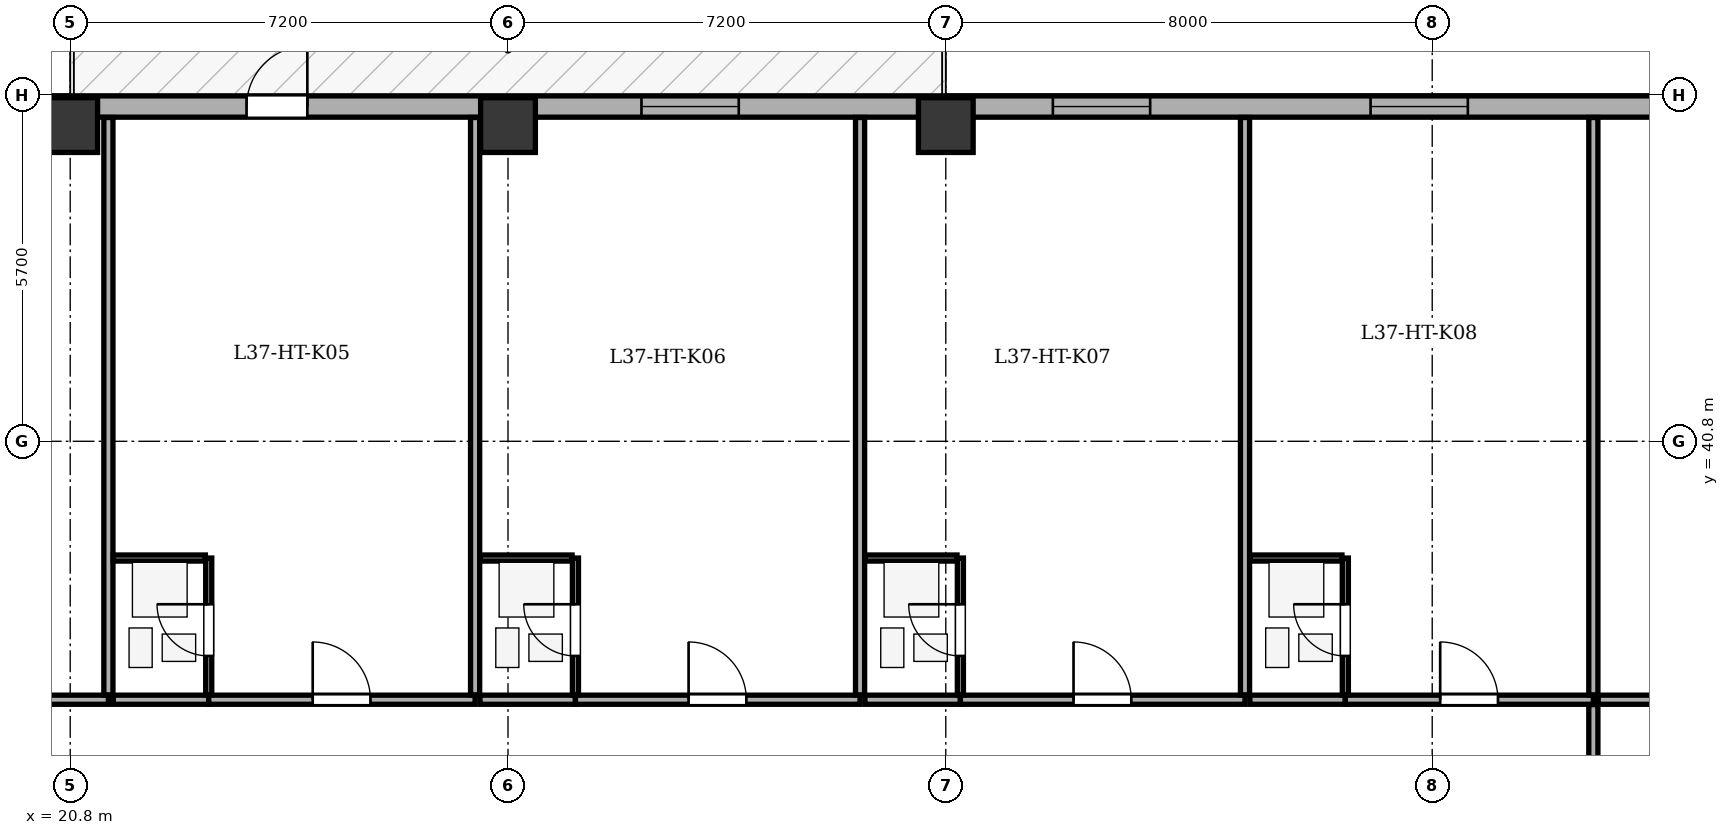
"""IFC4 building model, lengths in metres.
Left out: names, types, materials, properties, quantities, classifications, styles, units other than length and angle.
Written with IfcOpenShell. Run it as: python <this file> out.ifc"""

import sys

from ifc_helpers import new_model, si_unit, direction, frame, frame_2d, origin, origin_2d, place, context, subcontext, project, spatial, rectangle, extrude, element, fill, save


model = new_model("IFC4")
c1 = context("Model", 3, precision=1e-05, world=origin(), true_north=direction((0.0, 1.0)))
c2 = subcontext(c1, "Body", "Model", "MODEL_VIEW")
j1 = project(units=[si_unit("LENGTHUNIT", "METRE"), si_unit("PLANEANGLEUNIT", "RADIAN")], contexts=[c1])
p1 = place(None, origin())
s1 = spatial("IfcSite", under=j1, at=p1, CompositionType="ELEMENT")
p2 = place(p1, origin())
s2 = spatial("IfcBuilding", under=s1, at=p2, CompositionType="ELEMENT")
p3 = place(p2, frame((0.0, 0.0, 148.3)))
s3 = spatial("IfcBuildingStorey", under=s2, at=p3, CompositionType="ELEMENT", Elevation=148.3)
for number, where, z_axis, x_axis in (
    (1, (20.8, 46.0, 0.0), (0.0, 0.0, 1.0), (1.0, 0.0, 0.0)),
    (2, (28.0, 46.0, 0.0), (0.0, 0.0, 1.0), (1.0, 0.0, 0.0)),
    (3, (35.2, 46.0, 0.0), (0.0, 0.0, 1.0), (1.0, 0.0, 0.0)),
):
    element("IfcColumn", number, at=place(p3, frame(where, z_axis=z_axis, x_axis=x_axis)), inside=s3, PredefinedType="COLUMN", context=c2, shape_type="SweptSolid", body=[
        extrude(rectangle(XDim=0.9, YDim=0.9, at=origin_2d()), origin(), (0.0, 0.0, 1.0), 3.5),
    ])
p4 = place(p3, frame((15.7, 46.305, 0.0), z_axis=(0.0, 0.0, 1.0), x_axis=(1.0, 0.0, 0.0)))
e4 = element("IfcWall", 4, at=p4, inside=s3, PredefinedType="STANDARD", context=c2, shape_type="SweptSolid", body=[
    extrude(rectangle(XDim=35.0, YDim=0.35, at=frame_2d((17.5, 0.0))), origin(), (0.0, 0.0, 1.0), 2.785),
])
p5 = place(p4, frame((8.0, 0.0, 0.0)))
e5 = element("IfcOpeningElement", 5, at=p5, cuts=e4, PredefinedType="OPENING", context=c2, shape_type="SweptSolid", body=[
    extrude(rectangle(XDim=1.0, YDim=2.02, at=frame_2d((0.5, 1.01))), frame((0.0, 0.185, 0.0), z_axis=(0.0, -1.0, 0.0), x_axis=(1.0, 0.0, 0.0)), (0.0, 0.0, 1.0), 0.37),
])
p6 = place(p4, frame((1.788, 0.0, 0.75)))
e6 = element("IfcOpeningElement", 6, at=p6, cuts=e4, PredefinedType="OPENING", context=c2, shape_type="SweptSolid", body=[
    extrude(rectangle(XDim=1.6, YDim=1.75, at=frame_2d((0.8, 0.875))), frame((0.0, 0.185, 0.0), z_axis=(0.0, -1.0, 0.0), x_axis=(1.0, 0.0, 0.0)), (0.0, 0.0, 1.0), 0.37),
])
p7 = place(p4, frame((14.495, 0.0, 0.75)))
e7 = element("IfcOpeningElement", 7, at=p7, cuts=e4, PredefinedType="OPENING", context=c2, shape_type="SweptSolid", body=[
    extrude(rectangle(XDim=1.6, YDim=1.75, at=frame_2d((0.8, 0.875))), frame((0.0, 0.185, 0.0), z_axis=(0.0, -1.0, 0.0), x_axis=(1.0, 0.0, 0.0)), (0.0, 0.0, 1.0), 0.37),
])
p8 = place(p4, frame((21.261, 0.0, 0.75)))
e8 = element("IfcOpeningElement", 8, at=p8, cuts=e4, PredefinedType="OPENING", context=c2, shape_type="SweptSolid", body=[
    extrude(rectangle(XDim=1.6, YDim=1.75, at=frame_2d((0.8, 0.875))), frame((0.0, 0.185, 0.0), z_axis=(0.0, -1.0, 0.0), x_axis=(1.0, 0.0, 0.0)), (0.0, 0.0, 1.0), 0.37),
])
p9 = place(p4, frame((26.486, 0.0, 0.75)))
e9 = element("IfcOpeningElement", 9, at=p9, cuts=e4, PredefinedType="OPENING", context=c2, shape_type="SweptSolid", body=[
    extrude(rectangle(XDim=1.6, YDim=1.75, at=frame_2d((0.8, 0.875))), frame((0.0, 0.185, 0.0), z_axis=(0.0, -1.0, 0.0), x_axis=(1.0, 0.0, 0.0)), (0.0, 0.0, 1.0), 0.37),
])
p10 = place(p4, frame((31.637, 0.0, 0.75)))
e10 = element("IfcOpeningElement", 10, at=p10, cuts=e4, PredefinedType="OPENING", context=c2, shape_type="SweptSolid", body=[
    extrude(rectangle(XDim=1.6, YDim=1.75, at=frame_2d((0.8, 0.875))), frame((0.0, 0.185, 0.0), z_axis=(0.0, -1.0, 0.0), x_axis=(1.0, 0.0, 0.0)), (0.0, 0.0, 1.0), 0.37),
])
p11 = place(p3, frame((17.35, 36.55, 0.0), z_axis=(0.0, 0.0, 1.0), x_axis=(1.0, 0.0, 0.0)))
e11 = element("IfcWall", 11, at=p11, inside=s3, PredefinedType="PARTITIONING", context=c2, shape_type="SweptSolid", body=[
    extrude(rectangle(XDim=4.078, YDim=0.15, at=frame_2d((2.039, 0.0))), origin(), (0.0, 0.0, 1.0), 3.2),
])
p12 = place(p11, frame((1.559, 0.0, 0.0)))
e12 = element("IfcOpeningElement", 12, at=p12, cuts=e11, PredefinedType="OPENING", context=c2, shape_type="SweptSolid", body=[
    extrude(rectangle(XDim=0.95, YDim=2.1, at=frame_2d((0.475, 1.05))), frame((0.0, 0.085, 0.0), z_axis=(0.0, -1.0, 0.0), x_axis=(1.0, 0.0, 0.0)), (0.0, 0.0, 1.0), 0.17),
])
p13 = place(p3, frame((21.428, 36.63, 0.0), z_axis=(0.0, 0.0, 1.0), x_axis=(0.0, 1.0, 0.0)))
e13 = element("IfcWall", 13, at=p13, inside=s3, PredefinedType="PARTITIONING", context=c2, shape_type="SweptSolid", body=[
    extrude(rectangle(XDim=9.495, YDim=0.15, at=frame_2d((4.748, 0.0))), origin(), (0.0, 0.0, 1.0), 3.2),
])
p14 = place(p3, frame((21.508, 36.55, 0.0), z_axis=(0.0, 0.0, 1.0), x_axis=(1.0, 0.0, 0.0)))
e14 = element("IfcWall", 14, at=p14, inside=s3, PredefinedType="PARTITIONING", context=c2, shape_type="SweptSolid", body=[
    extrude(rectangle(XDim=1.57, YDim=0.15, at=frame_2d((0.785, 0.0))), origin(), (0.0, 0.0, 1.0), 3.2),
])
p15 = place(p3, frame((23.078, 36.55, 0.0), z_axis=(0.0, 0.0, 1.0), x_axis=(1.0, 0.0, 0.0)))
e15 = element("IfcWall", 15, at=p15, inside=s3, PredefinedType="PARTITIONING", context=c2, shape_type="SweptSolid", body=[
    extrude(rectangle(XDim=4.381, YDim=0.15, at=frame_2d((2.19, 0.0))), origin(), (0.0, 0.0, 1.0), 3.2),
])
p16 = place(p15, frame((1.71, 0.0, 0.0)))
e16 = element("IfcOpeningElement", 16, at=p16, cuts=e15, PredefinedType="OPENING", context=c2, shape_type="SweptSolid", body=[
    extrude(rectangle(XDim=0.95, YDim=2.1, at=frame_2d((0.475, 1.05))), frame((0.0, 0.085, 0.0), z_axis=(0.0, -1.0, 0.0), x_axis=(1.0, 0.0, 0.0)), (0.0, 0.0, 1.0), 0.17),
])
p17 = place(p3, frame((23.078, 36.63, 0.0), z_axis=(0.0, 0.0, 1.0), x_axis=(0.0, 1.0, 0.0)))
e17 = element("IfcWall", 17, at=p17, inside=s3, PredefinedType="PARTITIONING", context=c2, shape_type="SweptSolid", body=[
    extrude(rectangle(XDim=2.25, YDim=0.1, at=frame_2d((1.125, 0.0))), origin(), (0.0, 0.0, 1.0), 3.2),
])
p18 = place(p17, frame((0.64, 0.0, 0.0)))
e18 = element("IfcOpeningElement", 18, at=p18, cuts=e17, PredefinedType="OPENING", context=c2, shape_type="SweptSolid", body=[
    extrude(rectangle(XDim=0.85, YDim=2.05, at=frame_2d((0.425, 1.025))), frame((0.0, 0.06, 0.0), z_axis=(0.0, -1.0, 0.0), x_axis=(1.0, 0.0, 0.0)), (0.0, 0.0, 1.0), 0.12),
])
p19 = place(p3, frame((21.508, 38.88, 0.0), z_axis=(0.0, 0.0, 1.0), x_axis=(1.0, 0.0, 0.0)))
e19 = element("IfcWall", 19, at=p19, inside=s3, PredefinedType="PARTITIONING", context=c2, shape_type="SweptSolid", body=[
    extrude(rectangle(XDim=1.515, YDim=0.1, at=frame_2d((0.757, 0.0))), origin(), (0.0, 0.0, 1.0), 3.2),
])
p20 = place(p3, frame((27.459, 36.63, 0.0), z_axis=(0.0, 0.0, 1.0), x_axis=(0.0, 1.0, 0.0)))
e20 = element("IfcWall", 20, at=p20, inside=s3, PredefinedType="PARTITIONING", context=c2, shape_type="SweptSolid", body=[
    extrude(rectangle(XDim=9.495, YDim=0.15, at=frame_2d((4.748, 0.0))), origin(), (0.0, 0.0, 1.0), 3.2),
])
p21 = place(p3, frame((27.539, 36.55, 0.0), z_axis=(0.0, 0.0, 1.0), x_axis=(1.0, 0.0, 0.0)))
e21 = element("IfcWall", 21, at=p21, inside=s3, PredefinedType="PARTITIONING", context=c2, shape_type="SweptSolid", body=[
    extrude(rectangle(XDim=1.57, YDim=0.15, at=frame_2d((0.785, 0.0))), origin(), (0.0, 0.0, 1.0), 3.2),
])
p22 = place(p3, frame((29.109, 36.55, 0.0), z_axis=(0.0, 0.0, 1.0), x_axis=(1.0, 0.0, 0.0)))
e22 = element("IfcWall", 22, at=p22, inside=s3, PredefinedType="PARTITIONING", context=c2, shape_type="SweptSolid", body=[
    extrude(rectangle(XDim=4.681, YDim=0.15, at=frame_2d((2.341, 0.0))), origin(), (0.0, 0.0, 1.0), 3.2),
])
p23 = place(p22, frame((1.861, 0.0, 0.0)))
e23 = element("IfcOpeningElement", 23, at=p23, cuts=e22, PredefinedType="OPENING", context=c2, shape_type="SweptSolid", body=[
    extrude(rectangle(XDim=0.95, YDim=2.1, at=frame_2d((0.475, 1.05))), frame((0.0, 0.085, 0.0), z_axis=(0.0, -1.0, 0.0), x_axis=(1.0, 0.0, 0.0)), (0.0, 0.0, 1.0), 0.17),
])
p24 = place(p3, frame((29.109, 36.63, 0.0), z_axis=(0.0, 0.0, 1.0), x_axis=(0.0, 1.0, 0.0)))
e24 = element("IfcWall", 24, at=p24, inside=s3, PredefinedType="PARTITIONING", context=c2, shape_type="SweptSolid", body=[
    extrude(rectangle(XDim=2.25, YDim=0.1, at=frame_2d((1.125, 0.0))), origin(), (0.0, 0.0, 1.0), 3.2),
])
p25 = place(p24, frame((0.64, 0.0, 0.0)))
e25 = element("IfcOpeningElement", 25, at=p25, cuts=e24, PredefinedType="OPENING", context=c2, shape_type="SweptSolid", body=[
    extrude(rectangle(XDim=0.85, YDim=2.05, at=frame_2d((0.425, 1.025))), frame((0.0, 0.06, 0.0), z_axis=(0.0, -1.0, 0.0), x_axis=(1.0, 0.0, 0.0)), (0.0, 0.0, 1.0), 0.12),
])
p26 = place(p3, frame((27.539, 38.88, 0.0), z_axis=(0.0, 0.0, 1.0), x_axis=(1.0, 0.0, 0.0)))
e26 = element("IfcWall", 26, at=p26, inside=s3, PredefinedType="PARTITIONING", context=c2, shape_type="SweptSolid", body=[
    extrude(rectangle(XDim=1.515, YDim=0.1, at=frame_2d((0.757, 0.0))), origin(), (0.0, 0.0, 1.0), 3.2),
])
p27 = place(p3, frame((33.79, 36.63, 0.0), z_axis=(0.0, 0.0, 1.0), x_axis=(0.0, 1.0, 0.0)))
e27 = element("IfcWall", 27, at=p27, inside=s3, PredefinedType="PARTITIONING", context=c2, shape_type="SweptSolid", body=[
    extrude(rectangle(XDim=9.495, YDim=0.15, at=frame_2d((4.748, 0.0))), origin(), (0.0, 0.0, 1.0), 2.785),
])
p28 = place(p3, frame((33.87, 36.55, 0.0), z_axis=(0.0, 0.0, 1.0), x_axis=(1.0, 0.0, 0.0)))
e28 = element("IfcWall", 28, at=p28, inside=s3, PredefinedType="PARTITIONING", context=c2, shape_type="SweptSolid", body=[
    extrude(rectangle(XDim=1.57, YDim=0.15, at=frame_2d((0.785, 0.0))), origin(), (0.0, 0.0, 1.0), 3.2),
])
p29 = place(p3, frame((35.44, 36.55, 0.0), z_axis=(0.0, 0.0, 1.0), x_axis=(1.0, 0.0, 0.0)))
e29 = element("IfcWall", 29, at=p29, inside=s3, PredefinedType="PARTITIONING", context=c2, shape_type="SweptSolid", body=[
    extrude(rectangle(XDim=4.681, YDim=0.15, at=frame_2d((2.341, 0.0))), origin(), (0.0, 0.0, 1.0), 3.2),
])
p30 = place(p29, frame((1.861, 0.0, 0.0)))
e30 = element("IfcOpeningElement", 30, at=p30, cuts=e29, PredefinedType="OPENING", context=c2, shape_type="SweptSolid", body=[
    extrude(rectangle(XDim=0.95, YDim=2.1, at=frame_2d((0.475, 1.05))), frame((0.0, 0.085, 0.0), z_axis=(0.0, -1.0, 0.0), x_axis=(1.0, 0.0, 0.0)), (0.0, 0.0, 1.0), 0.17),
])
p31 = place(p3, frame((35.44, 36.63, 0.0), z_axis=(0.0, 0.0, 1.0), x_axis=(0.0, 1.0, 0.0)))
e31 = element("IfcWall", 31, at=p31, inside=s3, PredefinedType="PARTITIONING", context=c2, shape_type="SweptSolid", body=[
    extrude(rectangle(XDim=2.25, YDim=0.1, at=frame_2d((1.125, 0.0))), origin(), (0.0, 0.0, 1.0), 2.535),
])
p32 = place(p31, frame((0.64, 0.0, 0.0)))
e32 = element("IfcOpeningElement", 32, at=p32, cuts=e31, PredefinedType="OPENING", context=c2, shape_type="SweptSolid", body=[
    extrude(rectangle(XDim=0.85, YDim=2.05, at=frame_2d((0.425, 1.025))), frame((0.0, 0.06, 0.0), z_axis=(0.0, -1.0, 0.0), x_axis=(1.0, 0.0, 0.0)), (0.0, 0.0, 1.0), 0.12),
])
p33 = place(p3, frame((33.87, 38.88, 0.0), z_axis=(0.0, 0.0, 1.0), x_axis=(1.0, 0.0, 0.0)))
e33 = element("IfcWall", 33, at=p33, inside=s3, PredefinedType="PARTITIONING", context=c2, shape_type="SweptSolid", body=[
    extrude(rectangle(XDim=1.515, YDim=0.1, at=frame_2d((0.757, 0.0))), origin(), (0.0, 0.0, 1.0), 3.2),
])
p34 = place(p3, frame((40.121, 36.63, 0.0), z_axis=(0.0, 0.0, 1.0), x_axis=(0.0, 1.0, 0.0)))
e34 = element("IfcWall", 34, at=p34, inside=s3, PredefinedType="PARTITIONING", context=c2, shape_type="SweptSolid", body=[
    extrude(rectangle(XDim=9.495, YDim=0.15, at=frame_2d((4.748, 0.0))), origin(), (0.0, 0.0, 1.0), 3.2),
])
p35 = place(p3, frame((40.201, 36.55, 0.0), z_axis=(0.0, 0.0, 1.0), x_axis=(1.0, 0.0, 0.0)))
e35 = element("IfcWall", 35, at=p35, inside=s3, PredefinedType="PARTITIONING", context=c2, shape_type="SweptSolid", body=[
    extrude(rectangle(XDim=1.57, YDim=0.15, at=frame_2d((0.785, 0.0))), origin(), (0.0, 0.0, 1.0), 3.2),
])
p36 = place(p3, frame((41.771, 36.55, 0.0), z_axis=(0.0, 0.0, 1.0), x_axis=(1.0, 0.0, 0.0)))
e36 = element("IfcWall", 36, at=p36, inside=s3, PredefinedType="PARTITIONING", context=c2, shape_type="SweptSolid", body=[
    extrude(rectangle(XDim=4.079, YDim=0.15, at=frame_2d((2.04, 0.0))), origin(), (0.0, 0.0, 1.0), 3.2),
])
p37 = place(p36, frame((1.56, 0.0, 0.0)))
e37 = element("IfcOpeningElement", 37, at=p37, cuts=e36, PredefinedType="OPENING", context=c2, shape_type="SweptSolid", body=[
    extrude(rectangle(XDim=0.95, YDim=2.1, at=frame_2d((0.475, 1.05))), frame((0.0, 0.085, 0.0), z_axis=(0.0, -1.0, 0.0), x_axis=(1.0, 0.0, 0.0)), (0.0, 0.0, 1.0), 0.17),
])
p38 = place(p3, frame((41.771, 36.63, 0.0), z_axis=(0.0, 0.0, 1.0), x_axis=(0.0, 1.0, 0.0)))
e38 = element("IfcWall", 38, at=p38, inside=s3, PredefinedType="PARTITIONING", context=c2, shape_type="SweptSolid", body=[
    extrude(rectangle(XDim=2.25, YDim=0.1, at=frame_2d((1.125, 0.0))), origin(), (0.0, 0.0, 1.0), 3.2),
])
p39 = place(p38, frame((0.64, 0.0, 0.0)))
e39 = element("IfcOpeningElement", 39, at=p39, cuts=e38, PredefinedType="OPENING", context=c2, shape_type="SweptSolid", body=[
    extrude(rectangle(XDim=0.85, YDim=2.05, at=frame_2d((0.425, 1.025))), frame((0.0, 0.06, 0.0), z_axis=(0.0, -1.0, 0.0), x_axis=(1.0, 0.0, 0.0)), (0.0, 0.0, 1.0), 0.12),
])
p40 = place(p3, frame((40.201, 38.88, 0.0), z_axis=(0.0, 0.0, 1.0), x_axis=(1.0, 0.0, 0.0)))
e40 = element("IfcWall", 40, at=p40, inside=s3, PredefinedType="PARTITIONING", context=c2, shape_type="SweptSolid", body=[
    extrude(rectangle(XDim=1.515, YDim=0.1, at=frame_2d((0.758, 0.0))), origin(), (0.0, 0.0, 1.0), 3.2),
])
p41 = place(p3, frame((45.85, 36.63, 0.0), z_axis=(0.0, 0.0, 1.0), x_axis=(0.0, 1.0, 0.0)))
e41 = element("IfcWall", 41, at=p41, inside=s3, PredefinedType="PARTITIONING", context=c2, shape_type="SweptSolid", body=[
    extrude(rectangle(XDim=9.495, YDim=0.15, at=frame_2d((4.748, 0.0))), origin(), (0.0, 0.0, 1.0), 3.2),
])
p42 = place(p3, frame((45.93, 36.55, 0.0), z_axis=(0.0, 0.0, 1.0), x_axis=(1.0, 0.0, 0.0)))
e42 = element("IfcWall", 42, at=p42, inside=s3, PredefinedType="PARTITIONING", context=c2, shape_type="SweptSolid", body=[
    extrude(rectangle(XDim=9.395, YDim=0.15, at=frame_2d((4.698, 0.0))), origin(), (0.0, 0.0, 1.0), 3.2),
])
p43 = place(p3, frame((45.85, 17.93, 0.0), z_axis=(0.0, 0.0, 1.0), x_axis=(0.0, 1.0, 0.0)))
e43 = element("IfcWall", 43, at=p43, inside=s3, PredefinedType="PARTITIONING", context=c2, shape_type="SweptSolid", body=[
    extrude(rectangle(XDim=18.54, YDim=0.15, at=frame_2d((9.27, 0.0))), origin(), (0.0, 0.0, 1.0), 3.2),
])
p44 = place(p43, frame((8.79, 0.0, 0.0)))
e44 = element("IfcOpeningElement", 44, at=p44, cuts=e43, PredefinedType="OPENING", context=c2, shape_type="SweptSolid", body=[
    extrude(rectangle(XDim=0.95, YDim=2.1, at=frame_2d((0.475, 1.05))), frame((0.0, 0.085, 0.0), z_axis=(0.0, -1.0, 0.0), x_axis=(1.0, 0.0, 0.0)), (0.0, 0.0, 1.0), 0.17),
])
p45 = place(p5, origin())
e45 = element("IfcDoor", 45, at=p45, inside=s3, OperationType="SINGLE_SWING_RIGHT", PredefinedType="DOOR", context=c2, shape_type="SweptSolid", body=[
    extrude(rectangle(XDim=1.0, YDim=2.02, at=frame_2d((0.5, 1.01))), frame((0.0, 0.025, 0.0), z_axis=(0.0, -1.0, 0.0), x_axis=(1.0, 0.0, 0.0)), (0.0, 0.0, 1.0), 0.05),
])
fill(e5, e45)
p46 = place(p7, origin())
e46 = element("IfcWindow", 46, at=p46, inside=s3, PartitioningType="SINGLE_PANEL", PredefinedType="WINDOW", context=c2, shape_type="SweptSolid", body=[
    extrude(rectangle(XDim=1.6, YDim=1.75, at=frame_2d((0.8, 0.875))), frame((0.0, -0.01, 0.0), z_axis=(0.0, -1.0, 0.0), x_axis=(1.0, 0.0, 0.0)), (0.0, 0.0, 1.0), 0.06),
])
fill(e7, e46)
p47 = place(p8, origin())
e47 = element("IfcWindow", 47, at=p47, inside=s3, PartitioningType="SINGLE_PANEL", PredefinedType="WINDOW", context=c2, shape_type="SweptSolid", body=[
    extrude(rectangle(XDim=1.6, YDim=1.75, at=frame_2d((0.8, 0.875))), frame((0.0, -0.01, 0.0), z_axis=(0.0, -1.0, 0.0), x_axis=(1.0, 0.0, 0.0)), (0.0, 0.0, 1.0), 0.06),
])
fill(e8, e47)
p48 = place(p9, origin())
e48 = element("IfcWindow", 48, at=p48, inside=s3, PartitioningType="SINGLE_PANEL", PredefinedType="WINDOW", context=c2, shape_type="SweptSolid", body=[
    extrude(rectangle(XDim=1.6, YDim=1.75, at=frame_2d((0.8, 0.875))), frame((0.0, -0.01, 0.0), z_axis=(0.0, -1.0, 0.0), x_axis=(1.0, 0.0, 0.0)), (0.0, 0.0, 1.0), 0.06),
])
fill(e9, e48)
p49 = place(p18, origin())
e49 = element("IfcDoor", 49, at=p49, inside=s3, OperationType="SINGLE_SWING_RIGHT", PredefinedType="DOOR", context=c2, shape_type="SweptSolid", body=[
    extrude(rectangle(XDim=0.85, YDim=2.05, at=frame_2d((0.425, 1.025))), frame((0.0, 0.025, 0.0), z_axis=(0.0, -1.0, 0.0), x_axis=(1.0, 0.0, 0.0)), (0.0, 0.0, 1.0), 0.05),
])
fill(e18, e49)
p50 = place(p16, origin())
e50 = element("IfcDoor", 50, at=p50, inside=s3, OperationType="SINGLE_SWING_LEFT", PredefinedType="DOOR", context=c2, shape_type="SweptSolid", body=[
    extrude(rectangle(XDim=0.95, YDim=2.1, at=frame_2d((0.475, 1.05))), frame((0.0, 0.025, 0.0), z_axis=(0.0, -1.0, 0.0), x_axis=(1.0, 0.0, 0.0)), (0.0, 0.0, 1.0), 0.05),
])
fill(e16, e50)
p51 = place(p25, origin())
e51 = element("IfcDoor", 51, at=p51, inside=s3, OperationType="SINGLE_SWING_RIGHT", PredefinedType="DOOR", context=c2, shape_type="SweptSolid", body=[
    extrude(rectangle(XDim=0.85, YDim=2.05, at=frame_2d((0.425, 1.025))), frame((0.0, 0.025, 0.0), z_axis=(0.0, -1.0, 0.0), x_axis=(1.0, 0.0, 0.0)), (0.0, 0.0, 1.0), 0.05),
])
fill(e25, e51)
p52 = place(p23, origin())
e52 = element("IfcDoor", 52, at=p52, inside=s3, OperationType="SINGLE_SWING_LEFT", PredefinedType="DOOR", context=c2, shape_type="SweptSolid", body=[
    extrude(rectangle(XDim=0.95, YDim=2.1, at=frame_2d((0.475, 1.05))), frame((0.0, 0.025, 0.0), z_axis=(0.0, -1.0, 0.0), x_axis=(1.0, 0.0, 0.0)), (0.0, 0.0, 1.0), 0.05),
])
fill(e23, e52)
p53 = place(p32, origin())
e53 = element("IfcDoor", 53, at=p53, inside=s3, OperationType="SINGLE_SWING_RIGHT", PredefinedType="DOOR", context=c2, shape_type="SweptSolid", body=[
    extrude(rectangle(XDim=0.85, YDim=2.05, at=frame_2d((0.425, 1.025))), frame((0.0, 0.025, 0.0), z_axis=(0.0, -1.0, 0.0), x_axis=(1.0, 0.0, 0.0)), (0.0, 0.0, 1.0), 0.05),
])
fill(e32, e53)
p54 = place(p30, origin())
e54 = element("IfcDoor", 54, at=p54, inside=s3, OperationType="SINGLE_SWING_LEFT", PredefinedType="DOOR", context=c2, shape_type="SweptSolid", body=[
    extrude(rectangle(XDim=0.95, YDim=2.1, at=frame_2d((0.475, 1.05))), frame((0.0, 0.025, 0.0), z_axis=(0.0, -1.0, 0.0), x_axis=(1.0, 0.0, 0.0)), (0.0, 0.0, 1.0), 0.05),
])
fill(e30, e54)
p55 = place(p39, origin())
e55 = element("IfcDoor", 55, at=p55, inside=s3, OperationType="SINGLE_SWING_RIGHT", PredefinedType="DOOR", context=c2, shape_type="SweptSolid", body=[
    extrude(rectangle(XDim=0.85, YDim=2.05, at=frame_2d((0.425, 1.025))), frame((0.0, 0.025, 0.0), z_axis=(0.0, -1.0, 0.0), x_axis=(1.0, 0.0, 0.0)), (0.0, 0.0, 1.0), 0.05),
])
fill(e39, e55)
p56 = place(p37, origin())
e56 = element("IfcDoor", 56, at=p56, inside=s3, OperationType="SINGLE_SWING_LEFT", PredefinedType="DOOR", context=c2, shape_type="SweptSolid", body=[
    extrude(rectangle(XDim=0.95, YDim=2.1, at=frame_2d((0.475, 1.05))), frame((0.0, 0.025, 0.0), z_axis=(0.0, -1.0, 0.0), x_axis=(1.0, 0.0, 0.0)), (0.0, 0.0, 1.0), 0.05),
])
fill(e37, e56)
save(model, sys.argv[1])
